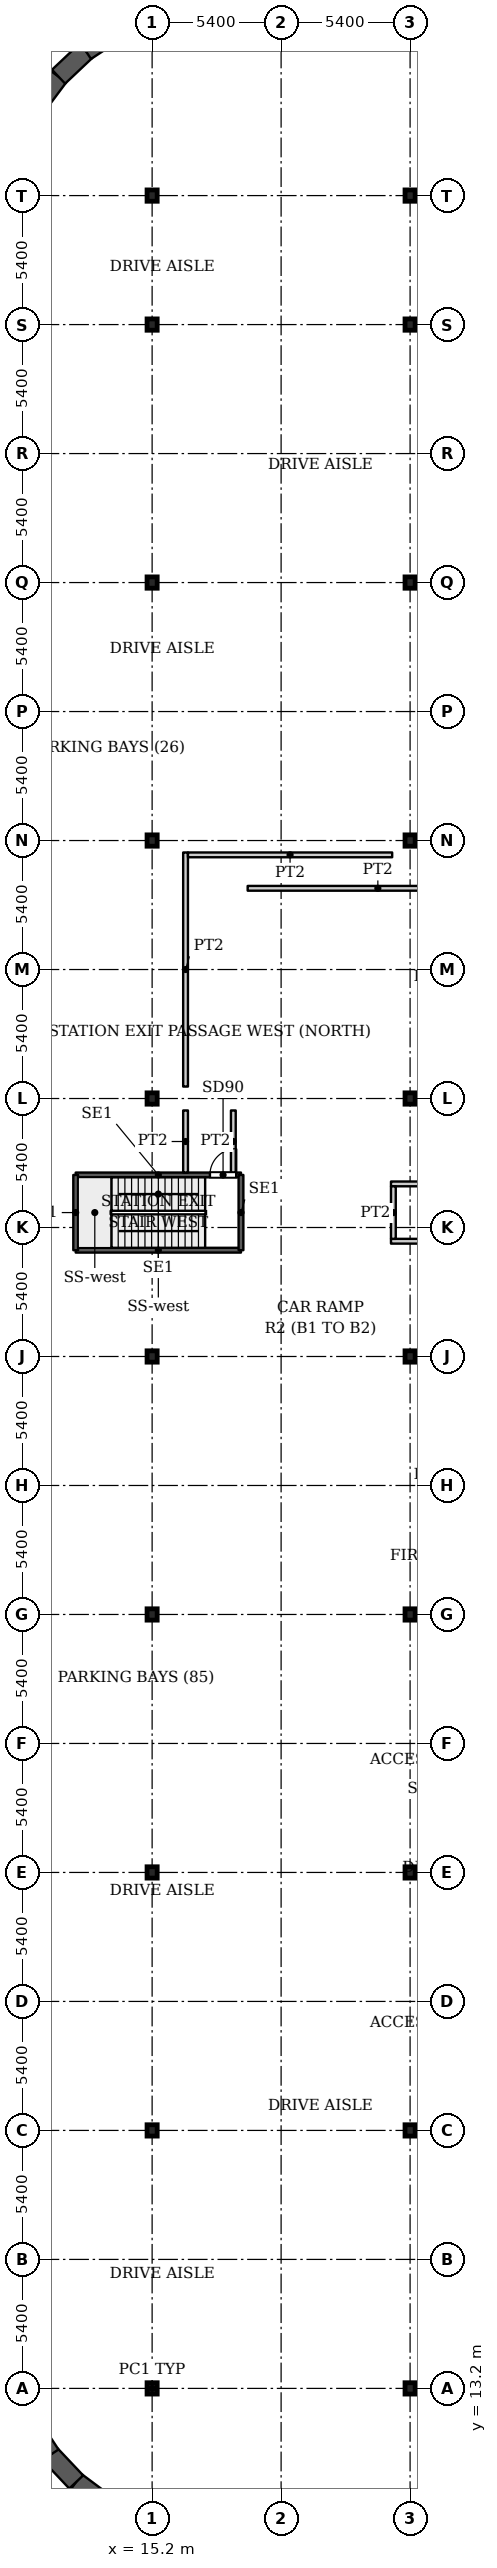
"""IFC4 building model, lengths in metres.
Left out: names, types, materials, properties, quantities, classifications, styles, units other than length and angle.
Written with IfcOpenShell. Run it as: python <this file> out.ifc"""

import sys

from ifc_helpers import new_model, si_unit, direction, frame, frame_2d, origin, origin_2d, place, context, subcontext, project, spatial, rectangle, i_section, extrude, source, transform, mapped, element, fill, save


model = new_model("IFC4")
c1 = context("Model", 3, precision=1e-05, world=origin(), true_north=direction((0.0, 1.0)))
c2 = subcontext(c1, "Body", "Model", "MODEL_VIEW")
j1 = project(units=[si_unit("LENGTHUNIT", "METRE"), si_unit("PLANEANGLEUNIT", "RADIAN")], contexts=[c1])
p1 = place(None, origin())
s1 = spatial("IfcSite", under=j1, at=p1, CompositionType="ELEMENT")
p2 = place(p1, origin())
s2 = spatial("IfcBuilding", under=s1, at=p2, CompositionType="ELEMENT")
p3 = place(p2, frame((0.0, 0.0, -10.0)))
s3 = spatial("IfcBuildingStorey", under=s2, at=p3, CompositionType="ELEMENT", Elevation=-10.0)
for number, where, z_axis, x_axis in (
    (1, (15.2, 13.2, 0.0), (0.0, 0.0, 1.0), (1.0, 0.0, 0.0)),
    (2, (26.0, 13.2, 0.0), (0.0, 0.0, 1.0), (1.0, 0.0, 0.0)),
    (3, (15.2, 24.0, 0.0), (0.0, 0.0, 1.0), (1.0, 0.0, 0.0)),
    (4, (26.0, 24.0, 0.0), (0.0, 0.0, 1.0), (1.0, 0.0, 0.0)),
    (5, (15.2, 34.8, 0.0), (0.0, 0.0, 1.0), (1.0, 0.0, 0.0)),
    (6, (26.0, 34.8, 0.0), (0.0, 0.0, 1.0), (1.0, 0.0, 0.0)),
    (7, (15.2, 45.6, 0.0), (0.0, 0.0, 1.0), (1.0, 0.0, 0.0)),
    (8, (26.0, 45.6, 0.0), (0.0, 0.0, 1.0), (1.0, 0.0, 0.0)),
    (9, (15.2, 56.4, 0.0), (0.0, 0.0, 1.0), (1.0, 0.0, 0.0)),
    (10, (26.0, 56.4, 0.0), (0.0, 0.0, 1.0), (1.0, 0.0, 0.0)),
    (11, (15.2, 67.2, 0.0), (0.0, 0.0, 1.0), (1.0, 0.0, 0.0)),
    (12, (26.0, 67.2, 0.0), (0.0, 0.0, 1.0), (1.0, 0.0, 0.0)),
    (13, (15.2, 78.0, 0.0), (0.0, 0.0, 1.0), (1.0, 0.0, 0.0)),
    (14, (26.0, 78.0, 0.0), (0.0, 0.0, 1.0), (1.0, 0.0, 0.0)),
    (15, (15.2, 88.8, 0.0), (0.0, 0.0, 1.0), (1.0, 0.0, 0.0)),
    (16, (26.0, 88.8, 0.0), (0.0, 0.0, 1.0), (1.0, 0.0, 0.0)),
    (17, (15.2, 99.6, 0.0), (0.0, 0.0, 1.0), (1.0, 0.0, 0.0)),
    (18, (26.0, 99.6, 0.0), (0.0, 0.0, 1.0), (1.0, 0.0, 0.0)),
    (19, (15.2, 105.0, 0.0), (0.0, 0.0, 1.0), (1.0, 0.0, 0.0)),
    (20, (26.0, 105.0, 0.0), (0.0, 0.0, 1.0), (1.0, 0.0, 0.0)),
):
    element("IfcColumn", number, at=place(p3, frame(where, z_axis=z_axis, x_axis=x_axis)), inside=s3, PredefinedType="COLUMN", context=c2, shape_type="SweptSolid", body=[
        extrude(i_section(OverallWidth=0.424, OverallDepth=0.474, WebThickness=0.048, FlangeThickness=0.077, FilletRadius=0.014, at=origin_2d()), origin(), (0.0, 0.0, 1.0), 5.0),
    ])
p4 = place(p3, frame((10.346, 108.721, 0.0), z_axis=(0.0, 0.0, 1.0), x_axis=(0.597630520512, 0.801771638905, 0.0)))
e21 = element("IfcWall", 21, at=p4, inside=s3, PredefinedType="SOLIDWALL", context=c2, shape_type="SweptSolid", body=[
    extrude(rectangle(XDim=1.568, YDim=0.8, at=frame_2d((0.784, 0.0))), origin(), (0.0, 0.0, 1.0), 5.0),
])
p5 = place(p3, frame((11.283, 109.978, 0.0), z_axis=(0.0, 0.0, 1.0), x_axis=(0.726995868662, 0.686641833089, 0.0)))
e22 = element("IfcWall", 22, at=p5, inside=s3, PredefinedType="SOLIDWALL", context=c2, shape_type="SweptSolid", body=[
    extrude(rectangle(XDim=1.567, YDim=0.8, at=frame_2d((0.783, 0.0))), origin(), (0.0, 0.0, 1.0), 5.0),
])
p6 = place(p3, frame((12.422, 111.054, 0.0), z_axis=(0.0, 0.0, 1.0), x_axis=(0.835603348101, 0.549333272834, 0.0)))
e23 = element("IfcWall", 23, at=p6, inside=s3, PredefinedType="SOLIDWALL", context=c2, shape_type="SweptSolid", body=[
    extrude(rectangle(XDim=1.568, YDim=0.8, at=frame_2d((0.784, 0.0))), origin(), (0.0, 0.0, 1.0), 5.0),
])
p7 = place(p3, frame((13.279, 8.346, 0.0), z_axis=(0.0, 0.0, 1.0), x_axis=(-0.801771638905, 0.597630520512, 0.0)))
e24 = element("IfcWall", 24, at=p7, inside=s3, PredefinedType="SOLIDWALL", context=c2, shape_type="SweptSolid", body=[
    extrude(rectangle(XDim=1.568, YDim=0.8, at=frame_2d((0.784, 0.0))), origin(), (0.0, 0.0, 1.0), 5.0),
])
p8 = place(p3, frame((12.022, 9.283, 0.0), z_axis=(0.0, 0.0, 1.0), x_axis=(-0.686641833089, 0.726995868662, 0.0)))
e25 = element("IfcWall", 25, at=p8, inside=s3, PredefinedType="SOLIDWALL", context=c2, shape_type="SweptSolid", body=[
    extrude(rectangle(XDim=1.567, YDim=0.8, at=frame_2d((0.783, 0.0))), origin(), (0.0, 0.0, 1.0), 5.0),
])
p9 = place(p3, frame((10.946, 10.422, 0.0), z_axis=(0.0, 0.0, 1.0), x_axis=(-0.549333272834, 0.835603348101, 0.0)))
e26 = element("IfcWall", 26, at=p9, inside=s3, PredefinedType="SOLIDWALL", context=c2, shape_type="SweptSolid", body=[
    extrude(rectangle(XDim=1.568, YDim=0.8, at=frame_2d((0.784, 0.0))), origin(), (0.0, 0.0, 1.0), 5.0),
])
p10 = place(p3, frame((12.0, 60.85, 0.0), z_axis=(0.0, 0.0, 1.0), x_axis=(1.0, 0.0, 0.0)))
e27 = element("IfcWall", 27, at=p10, inside=s3, PredefinedType="SHEAR", context=c2, shape_type="SweptSolid", body=[
    extrude(rectangle(XDim=6.92, YDim=0.2, at=frame_2d((3.46, 0.0))), origin(), (0.0, 0.0, 1.0), 5.0),
])
p11 = place(p3, frame((12.0, 64.0, 0.0), z_axis=(0.0, 0.0, 1.0), x_axis=(1.0, 0.0, 0.0)))
e28 = element("IfcWall", 28, at=p11, inside=s3, PredefinedType="SHEAR", context=c2, shape_type="SweptSolid", body=[
    extrude(rectangle(XDim=6.92, YDim=0.2, at=frame_2d((3.46, 0.0))), origin(), (0.0, 0.0, 1.0), 5.0),
])
p12 = place(p11, frame((5.62, 0.0, 0.0)))
e29 = element("IfcOpeningElement", 29, at=p12, cuts=e28, PredefinedType="OPENING", context=c2, shape_type="SweptSolid", body=[
    extrude(rectangle(XDim=1.1, YDim=2.2, at=frame_2d((0.55, 1.1))), frame((0.0, 0.11, 0.0), z_axis=(0.0, -1.0, 0.0), x_axis=(1.0, 0.0, 0.0)), (0.0, 0.0, 1.0), 0.22),
])
for number, where, z_axis, x_axis in (
    (30, (12.0, 60.85, 0.0), (0.0, 0.0, 1.0), (0.0, 1.0, 0.0)),
    (31, (18.92, 60.85, 0.0), (0.0, 0.0, 1.0), (0.0, 1.0, 0.0)),
):
    element("IfcWall", number, at=place(p3, frame(where, z_axis=z_axis, x_axis=x_axis)), inside=s3, PredefinedType="SHEAR", context=c2, shape_type="SweptSolid", body=[
        extrude(rectangle(XDim=3.15, YDim=0.2, at=frame_2d((1.575, 0.0))), origin(), (0.0, 0.0, 1.0), 5.0),
    ])
p13 = place(p3, frame((16.6, 64.1, 0.0), z_axis=(0.0, 0.0, 1.0), x_axis=(0.0, 1.0, 0.0)))
e32 = element("IfcWall", 32, at=p13, inside=s3, PredefinedType="PARTITIONING", context=c2, shape_type="SweptSolid", body=[
    extrude(rectangle(XDim=2.6, YDim=0.2, at=frame_2d((1.3, 0.0))), origin(), (0.0, 0.0, 1.0), 4.58),
])
p14 = place(p3, frame((16.6, 67.7, 0.0), z_axis=(0.0, 0.0, 1.0), x_axis=(0.0, 1.0, 0.0)))
e33 = element("IfcWall", 33, at=p14, inside=s3, PredefinedType="PARTITIONING", context=c2, shape_type="SweptSolid", body=[
    extrude(rectangle(XDim=9.8, YDim=0.2, at=frame_2d((4.9, 0.0))), origin(), (0.0, 0.0, 1.0), 4.58),
])
p15 = place(p3, frame((16.7, 77.4, 0.0), z_axis=(0.0, 0.0, 1.0), x_axis=(1.0, 0.0, 0.0)))
e34 = element("IfcWall", 34, at=p15, inside=s3, PredefinedType="PARTITIONING", context=c2, shape_type="SweptSolid", body=[
    extrude(rectangle(XDim=8.55, YDim=0.2, at=frame_2d((4.275, 0.0))), origin(), (0.0, 0.0, 1.0), 4.58),
])
p16 = place(p3, frame((18.6, 64.1, 0.0), z_axis=(0.0, 0.0, 1.0), x_axis=(0.0, 1.0, 0.0)))
e35 = element("IfcWall", 35, at=p16, inside=s3, PredefinedType="PARTITIONING", context=c2, shape_type="SweptSolid", body=[
    extrude(rectangle(XDim=2.6, YDim=0.2, at=frame_2d((1.3, 0.0))), origin(), (0.0, 0.0, 1.0), 4.58),
])
p17 = place(p3, frame((19.2, 76.0, 0.0), z_axis=(0.0, 0.0, 1.0), x_axis=(1.0, 0.0, 0.0)))
e36 = element("IfcWall", 36, at=p17, inside=s3, PredefinedType="PARTITIONING", context=c2, shape_type="SweptSolid", body=[
    extrude(rectangle(XDim=10.9, YDim=0.2, at=frame_2d((5.45, 0.0))), origin(), (0.0, 0.0, 1.0), 4.58),
])
for number, where, z_axis, x_axis in (
    (37, (25.2, 61.225, 0.0), (0.0, 0.0, 1.0), (1.0, 0.0, 0.0)),
    (38, (25.2, 63.625, 0.0), (0.0, 0.0, 1.0), (1.0, 0.0, 0.0)),
):
    element("IfcWall", number, at=place(p3, frame(where, z_axis=z_axis, x_axis=x_axis)), inside=s3, PredefinedType="PARTITIONING", context=c2, shape_type="SweptSolid", body=[
        extrude(rectangle(XDim=4.9, YDim=0.2, at=frame_2d((2.45, 0.0))), origin(), (0.0, 0.0, 1.0), 4.58),
    ])
p18 = place(p3, frame((25.3, 61.325, 0.0), z_axis=(0.0, 0.0, 1.0), x_axis=(0.0, 1.0, 0.0)))
e39 = element("IfcWall", 39, at=p18, inside=s3, PredefinedType="PARTITIONING", context=c2, shape_type="SweptSolid", body=[
    extrude(rectangle(XDim=2.2, YDim=0.2, at=frame_2d((1.1, 0.0))), origin(), (0.0, 0.0, 1.0), 4.58),
])
m1 = source(origin(), c2, "Body", "SweptSolid", [
    extrude(rectangle(XDim=1.1, YDim=2.2, at=frame_2d((0.55, 1.1))), frame((0.0, 0.025, 0.0), z_axis=(0.0, -1.0, 0.0), x_axis=(1.0, 0.0, 0.0)), (0.0, 0.0, 1.0), 0.05),
])
p19 = place(p12, origin())
e40 = element("IfcDoor", 40, at=p19, inside=s3, OperationType="SINGLE_SWING_LEFT", PredefinedType="DOOR", context=c2, shape_type="MappedRepresentation", body=[
    mapped(m1, transform((0.0, 0.0, 0.0), x_axis=(1.0, 0.0, 0.0), y_axis=(0.0, 1.0, 0.0), z_axis=(0.0, 0.0, 1.0), scale=1.0)),
])
fill(e29, e40)
save(model, sys.argv[1])
